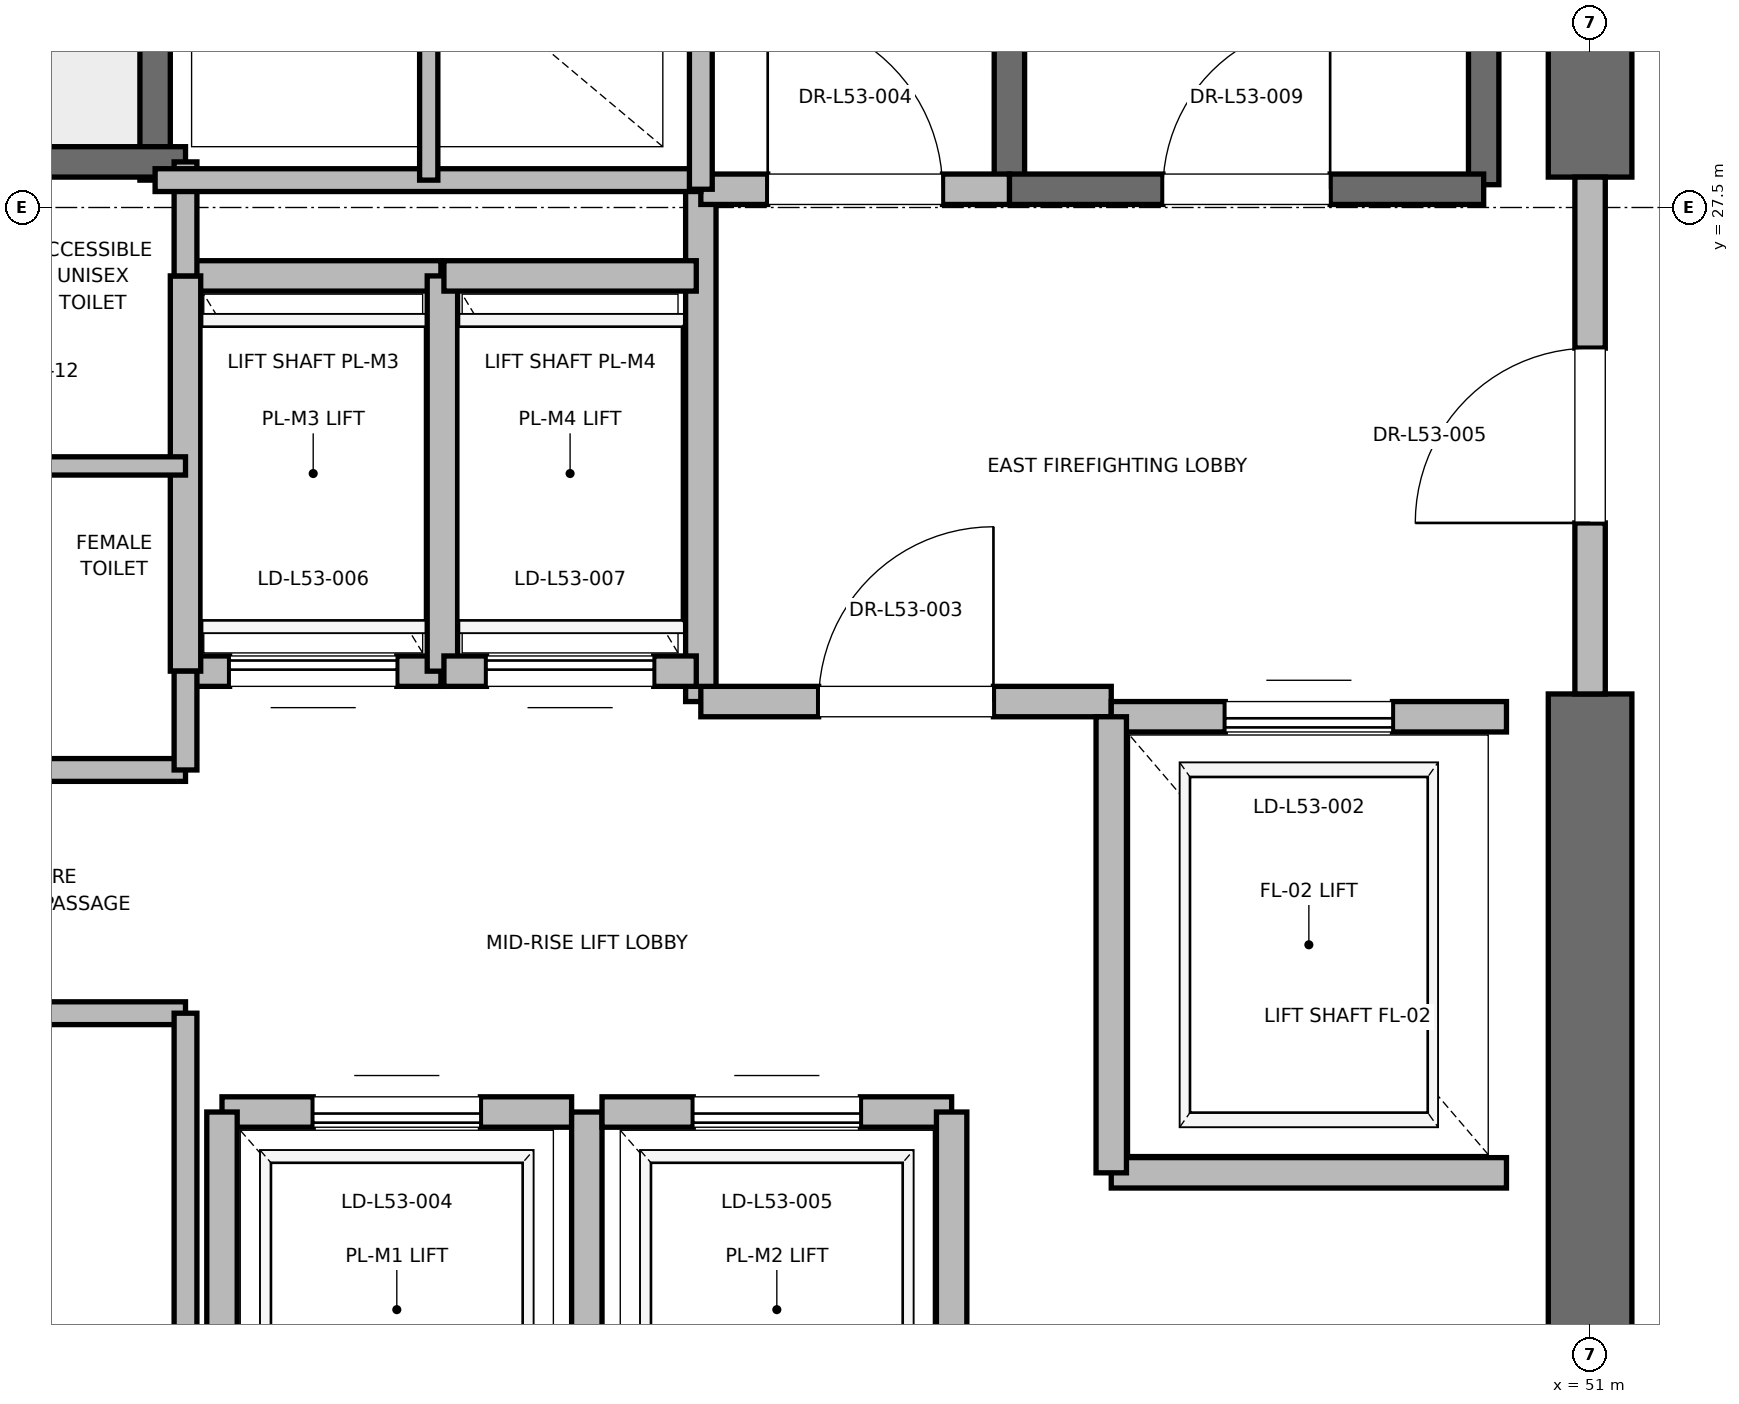
"""IFC4 building model, lengths in metres.
Left out: names, types, materials, properties, quantities, classifications, styles, units other than length and angle.
Written with IfcOpenShell. Run it as: python <this file> out.ifc"""

import sys

from ifc_helpers import new_model, si_unit, direction, frame, frame_2d, origin, place, context, subcontext, project, spatial, rectangle, extrude, element, fill, save


model = new_model("IFC4")
c1 = context("Model", 3, precision=1e-05, world=origin(), true_north=direction((0.0, 1.0)))
c2 = subcontext(c1, "Body", "Model", "MODEL_VIEW")
j1 = project(units=[si_unit("LENGTHUNIT", "METRE"), si_unit("PLANEANGLEUNIT", "RADIAN")], contexts=[c1])
p1 = place(None, origin())
s1 = spatial("IfcSite", under=j1, at=p1, CompositionType="ELEMENT")
p2 = place(p1, origin())
s2 = spatial("IfcBuilding", under=s1, at=p2, CompositionType="ELEMENT")
p3 = place(p2, frame((0.0, 0.0, 229.2)))
s3 = spatial("IfcBuildingStorey", under=s2, at=p3, CompositionType="ELEMENT", Elevation=229.2)
p4 = place(p3, frame((51.0, 18.5, 0.0), z_axis=(0.0, 0.0, 1.0), x_axis=(0.0, 1.0, 0.0)))
e1 = element("IfcWall", 1, at=p4, inside=s3, PredefinedType="SHEAR", context=c2, shape_type="SweptSolid", body=[
    extrude(rectangle(XDim=5.8, YDim=0.55, at=frame_2d((2.9, 0.0))), origin(), (0.0, 0.0, 1.0), 3.7),
])
p5 = place(p3, frame((51.0, 27.7, 0.0), z_axis=(0.0, 0.0, 1.0), x_axis=(0.0, 1.0, 0.0)))
e2 = element("IfcWall", 2, at=p5, inside=s3, PredefinedType="SHEAR", context=c2, shape_type="SweptSolid", body=[
    extrude(rectangle(XDim=8.8, YDim=0.55, at=frame_2d((4.4, 0.0))), origin(), (0.0, 0.0, 1.0), 3.7),
])
p6 = place(p3, frame((50.3, 27.65, 0.0), z_axis=(0.0, 0.0, 1.0), x_axis=(0.0, 1.0, 0.0)))
e3 = element("IfcWall", 3, at=p6, inside=s3, PredefinedType="SOLIDWALL", context=c2, shape_type="SweptSolid", body=[
    extrude(rectangle(XDim=8.15, YDim=0.2, at=frame_2d((4.075, 0.0))), origin(), (0.0, 0.0, 1.0), 3.7),
])
p7 = place(p3, frame((47.18, 27.62, 0.0), z_axis=(0.0, 0.0, 1.0), x_axis=(0.0, 1.0, 0.0)))
e4 = element("IfcWall", 4, at=p7, inside=s3, PredefinedType="SOLIDWALL", context=c2, shape_type="SweptSolid", body=[
    extrude(rectangle(XDim=8.18, YDim=0.2, at=frame_2d((4.09, 0.0))), origin(), (0.0, 0.0, 1.0), 3.7),
])
p8 = place(p3, frame((47.18, 27.62, 0.0), z_axis=(0.0, 0.0, 1.0), x_axis=(1.0, 0.0, 0.0)))
e5 = element("IfcWall", 5, at=p8, inside=s3, PredefinedType="SOLIDWALL", context=c2, shape_type="SweptSolid", body=[
    extrude(rectangle(XDim=3.12, YDim=0.2, at=frame_2d((1.56, 0.0))), origin(), (0.0, 0.0, 1.0), 3.7),
])
p9 = place(p8, frame((1.01, 0.0, 0.0)))
e6 = element("IfcOpeningElement", 6, at=p9, cuts=e5, PredefinedType="OPENING", context=c2, shape_type="SweptSolid", body=[
    extrude(rectangle(XDim=1.1, YDim=2.15, at=frame_2d((0.55, 1.075))), frame((0.0, 0.1, 0.0), z_axis=(0.0, -1.0, 0.0), x_axis=(1.0, 0.0, 0.0)), (0.0, 0.0, 1.0), 0.2),
])
p10 = place(p3, frame((41.56, 27.68, 0.0), z_axis=(0.0, 0.0, 1.0), x_axis=(0.0, 1.0, 0.0)))
e7 = element("IfcWall", 7, at=p10, inside=s3, PredefinedType="SOLIDWALL", context=c2, shape_type="SweptSolid", body=[
    extrude(rectangle(XDim=8.57, YDim=0.2, at=frame_2d((4.285, 0.0))), origin(), (0.0, 0.0, 1.0), 3.7),
])
p11 = place(p3, frame((38.44, 27.8, 0.0), z_axis=(0.0, 0.0, 1.0), x_axis=(1.0, 0.0, 0.0)))
e8 = element("IfcWall", 8, at=p11, inside=s3, PredefinedType="SOLIDWALL", context=c2, shape_type="SweptSolid", body=[
    extrude(rectangle(XDim=3.32, YDim=0.2, at=frame_2d((1.66, 0.0))), origin(), (0.0, 0.0, 1.0), 3.7),
])
p12 = place(p3, frame((45.15, 24.25, 0.0), z_axis=(0.0, 0.0, 1.0), x_axis=(0.0, 1.0, 0.0)))
e9 = element("IfcWall", 9, at=p12, inside=s3, PredefinedType="PARTITIONING", context=c2, shape_type="SweptSolid", body=[
    extrude(rectangle(XDim=3.37, YDim=0.2, at=frame_2d((1.685, 0.0))), origin(), (0.0, 0.0, 1.0), 3.7),
])
p13 = place(p3, frame((45.15, 24.25, 0.0), z_axis=(0.0, 0.0, 1.0), x_axis=(1.0, 0.0, 0.0)))
e10 = element("IfcWall", 10, at=p13, inside=s3, PredefinedType="PARTITIONING", context=c2, shape_type="SweptSolid", body=[
    extrude(rectangle(XDim=2.7, YDim=0.2, at=frame_2d((1.35, 0.0))), origin(), (0.0, 0.0, 1.0), 3.7),
])
p14 = place(p13, frame((0.775, 0.0, 0.0)))
e11 = element("IfcOpeningElement", 11, at=p14, cuts=e10, PredefinedType="OPENING", context=c2, shape_type="SweptSolid", body=[
    extrude(rectangle(XDim=1.15, YDim=2.2, at=frame_2d((0.575, 1.1))), frame((0.0, 0.1, 0.0), z_axis=(0.0, -1.0, 0.0), x_axis=(1.0, 0.0, 0.0)), (0.0, 0.0, 1.0), 0.2),
])
p15 = place(p3, frame((45.15, 27.62, 0.0), z_axis=(0.0, 0.0, 1.0), x_axis=(1.0, 0.0, 0.0)))
e12 = element("IfcWall", 12, at=p15, inside=s3, PredefinedType="PARTITIONING", context=c2, shape_type="SweptSolid", body=[
    extrude(rectangle(XDim=2.03, YDim=0.2, at=frame_2d((1.015, 0.0))), origin(), (0.0, 0.0, 1.0), 3.7),
])
p16 = place(p15, frame((0.44, 0.0, 0.0)))
e13 = element("IfcOpeningElement", 13, at=p16, cuts=e12, PredefinedType="OPENING", context=c2, shape_type="SweptSolid", body=[
    extrude(rectangle(XDim=1.15, YDim=2.2, at=frame_2d((0.575, 1.1))), frame((0.0, 0.1, 0.0), z_axis=(0.0, -1.0, 0.0), x_axis=(1.0, 0.0, 0.0)), (0.0, 0.0, 1.0), 0.2),
])
p17 = place(p3, frame((51.0, 24.3, 0.0), z_axis=(0.0, 0.0, 1.0), x_axis=(0.0, 1.0, 0.0)))
e14 = element("IfcWall", 14, at=p17, inside=s3, PredefinedType="PARTITIONING", context=c2, shape_type="SweptSolid", body=[
    extrude(rectangle(XDim=3.4, YDim=0.2, at=frame_2d((1.7, 0.0))), origin(), (0.0, 0.0, 1.0), 2.68),
])
p18 = place(p17, frame((1.125, 0.0, 0.0)))
e15 = element("IfcOpeningElement", 15, at=p18, cuts=e14, PredefinedType="OPENING", context=c2, shape_type="SweptSolid", body=[
    extrude(rectangle(XDim=1.15, YDim=2.2, at=frame_2d((0.575, 1.1))), frame((0.0, 0.1, 0.0), z_axis=(0.0, -1.0, 0.0), x_axis=(1.0, 0.0, 0.0)), (0.0, 0.0, 1.0), 0.2),
])
p19 = place(p3, frame((47.85, 21.15, 0.0), z_axis=(0.0, 0.0, 1.0), x_axis=(1.0, 0.0, 0.0)))
e16 = element("IfcWall", 16, at=p19, inside=s3, PredefinedType="SOLIDWALL", context=c2, shape_type="SweptSolid", body=[
    extrude(rectangle(XDim=2.6, YDim=0.2, at=frame_2d((1.3, 0.0))), origin(), (0.0, 0.0, 1.0), 3.7),
])
p20 = place(p3, frame((50.45, 24.15, 0.0), z_axis=(0.0, 0.0, 1.0), x_axis=(-1.0, 0.0, 0.0)))
e17 = element("IfcWall", 17, at=p20, inside=s3, PredefinedType="SOLIDWALL", context=c2, shape_type="SweptSolid", body=[
    extrude(rectangle(XDim=2.6, YDim=0.2, at=frame_2d((1.3, 0.0))), origin(), (0.0, 0.0, 1.0), 2.68),
])
p21 = place(p20, frame((0.75, 0.0, 0.0)))
e18 = element("IfcOpeningElement", 18, at=p21, cuts=e17, PredefinedType="OPENING", context=c2, shape_type="SweptSolid", body=[
    extrude(rectangle(XDim=1.1, YDim=2.2, at=frame_2d((0.55, 1.1))), frame((0.0, 0.1, 0.0), z_axis=(0.0, -1.0, 0.0), x_axis=(1.0, 0.0, 0.0)), (0.0, 0.0, 1.0), 0.2),
])
p22 = place(p3, frame((47.85, 24.15, 0.0), z_axis=(0.0, 0.0, 1.0), x_axis=(0.0, -1.0, 0.0)))
e19 = element("IfcWall", 19, at=p22, inside=s3, PredefinedType="SOLIDWALL", context=c2, shape_type="SweptSolid", body=[
    extrude(rectangle(XDim=3.0, YDim=0.2, at=frame_2d((1.5, 0.0))), origin(), (0.0, 0.0, 1.0), 3.7),
])
p23 = place(p3, frame((44.3, 21.55, 0.0), z_axis=(0.0, 0.0, 1.0), x_axis=(-1.0, 0.0, 0.0)))
e20 = element("IfcWall", 20, at=p23, inside=s3, PredefinedType="SOLIDWALL", context=c2, shape_type="SweptSolid", body=[
    extrude(rectangle(XDim=2.3, YDim=0.2, at=frame_2d((1.15, 0.0))), origin(), (0.0, 0.0, 1.0), 3.7),
])
p24 = place(p23, frame((0.6, 0.0, 0.0)))
e21 = element("IfcOpeningElement", 21, at=p24, cuts=e20, PredefinedType="OPENING", context=c2, shape_type="SweptSolid", body=[
    extrude(rectangle(XDim=1.1, YDim=2.2, at=frame_2d((0.55, 1.1))), frame((0.0, 0.1, 0.0), z_axis=(0.0, -1.0, 0.0), x_axis=(1.0, 0.0, 0.0)), (0.0, 0.0, 1.0), 0.2),
])
p25 = place(p3, frame((42.0, 21.55, 0.0), z_axis=(0.0, 0.0, 1.0), x_axis=(0.0, -1.0, 0.0)))
e22 = element("IfcWall", 22, at=p25, inside=s3, PredefinedType="SOLIDWALL", context=c2, shape_type="SweptSolid", body=[
    extrude(rectangle(XDim=2.6, YDim=0.2, at=frame_2d((1.3, 0.0))), origin(), (0.0, 0.0, 1.0), 2.68),
])
p26 = place(p3, frame((44.4, 18.95, 0.0), z_axis=(0.0, 0.0, 1.0), x_axis=(0.0, 1.0, 0.0)))
e23 = element("IfcWall", 23, at=p26, inside=s3, PredefinedType="SOLIDWALL", context=c2, shape_type="SweptSolid", body=[
    extrude(rectangle(XDim=2.6, YDim=0.2, at=frame_2d((1.3, 0.0))), origin(), (0.0, 0.0, 1.0), 3.7),
])
p27 = place(p3, frame((46.8, 21.55, 0.0), z_axis=(0.0, 0.0, 1.0), x_axis=(-1.0, 0.0, 0.0)))
e24 = element("IfcWall", 24, at=p27, inside=s3, PredefinedType="SOLIDWALL", context=c2, shape_type="SweptSolid", body=[
    extrude(rectangle(XDim=2.3, YDim=0.2, at=frame_2d((1.15, 0.0))), origin(), (0.0, 0.0, 1.0), 3.7),
])
p28 = place(p27, frame((0.6, 0.0, 0.0)))
e25 = element("IfcOpeningElement", 25, at=p28, cuts=e24, PredefinedType="OPENING", context=c2, shape_type="SweptSolid", body=[
    extrude(rectangle(XDim=1.1, YDim=2.2, at=frame_2d((0.55, 1.1))), frame((0.0, 0.1, 0.0), z_axis=(0.0, -1.0, 0.0), x_axis=(1.0, 0.0, 0.0)), (0.0, 0.0, 1.0), 0.2),
])
p29 = place(p3, frame((46.8, 18.95, 0.0), z_axis=(0.0, 0.0, 1.0), x_axis=(0.0, 1.0, 0.0)))
e26 = element("IfcWall", 26, at=p29, inside=s3, PredefinedType="SOLIDWALL", context=c2, shape_type="SweptSolid", body=[
    extrude(rectangle(XDim=2.6, YDim=0.2, at=frame_2d((1.3, 0.0))), origin(), (0.0, 0.0, 1.0), 3.7),
])
p30 = place(p3, frame((41.76, 24.45, 0.0), z_axis=(0.0, 0.0, 1.0), x_axis=(1.0, 0.0, 0.0)))
e27 = element("IfcWall", 27, at=p30, inside=s3, PredefinedType="SOLIDWALL", context=c2, shape_type="SweptSolid", body=[
    extrude(rectangle(XDim=1.68, YDim=0.2, at=frame_2d((0.84, 0.0))), origin(), (0.0, 0.0, 1.0), 3.7),
])
p31 = place(p30, frame((0.29, 0.0, 0.0)))
e28 = element("IfcOpeningElement", 28, at=p31, cuts=e27, PredefinedType="OPENING", context=c2, shape_type="SweptSolid", body=[
    extrude(rectangle(XDim=1.1, YDim=2.2, at=frame_2d((0.55, 1.1))), frame((0.0, 0.1, 0.0), z_axis=(0.0, -1.0, 0.0), x_axis=(1.0, 0.0, 0.0)), (0.0, 0.0, 1.0), 0.2),
])
p32 = place(p3, frame((43.44, 27.05, 0.0), z_axis=(0.0, 0.0, 1.0), x_axis=(-1.0, 0.0, 0.0)))
e29 = element("IfcWall", 29, at=p32, inside=s3, PredefinedType="SOLIDWALL", context=c2, shape_type="SweptSolid", body=[
    extrude(rectangle(XDim=1.68, YDim=0.2, at=frame_2d((0.84, 0.0))), origin(), (0.0, 0.0, 1.0), 3.7),
])
for number, where, z_axis, x_axis in (
    (30, (41.76, 27.05, 0.0), (0.0, 0.0, 1.0), (0.0, -1.0, 0.0)),
    (31, (43.45, 24.45, 0.0), (0.0, 0.0, 1.0), (0.0, 1.0, 0.0)),
):
    element("IfcWall", number, at=place(p3, frame(where, z_axis=z_axis, x_axis=x_axis)), inside=s3, PredefinedType="SOLIDWALL", context=c2, shape_type="SweptSolid", body=[
        extrude(rectangle(XDim=2.6, YDim=0.2, at=frame_2d((1.3, 0.0))), origin(), (0.0, 0.0, 1.0), 3.7),
    ])
p33 = place(p3, frame((43.46, 24.45, 0.0), z_axis=(0.0, 0.0, 1.0), x_axis=(1.0, 0.0, 0.0)))
e32 = element("IfcWall", 32, at=p33, inside=s3, PredefinedType="SOLIDWALL", context=c2, shape_type="SweptSolid", body=[
    extrude(rectangle(XDim=1.66, YDim=0.2, at=frame_2d((0.83, 0.0))), origin(), (0.0, 0.0, 1.0), 3.7),
])
p34 = place(p33, frame((0.28, 0.0, 0.0)))
e33 = element("IfcOpeningElement", 33, at=p34, cuts=e32, PredefinedType="OPENING", context=c2, shape_type="SweptSolid", body=[
    extrude(rectangle(XDim=1.1, YDim=2.2, at=frame_2d((0.55, 1.1))), frame((0.0, 0.1, 0.0), z_axis=(0.0, -1.0, 0.0), x_axis=(1.0, 0.0, 0.0)), (0.0, 0.0, 1.0), 0.2),
])
p35 = place(p3, frame((45.12, 27.05, 0.0), z_axis=(0.0, 0.0, 1.0), x_axis=(-1.0, 0.0, 0.0)))
e34 = element("IfcWall", 34, at=p35, inside=s3, PredefinedType="SOLIDWALL", context=c2, shape_type="SweptSolid", body=[
    extrude(rectangle(XDim=1.66, YDim=0.2, at=frame_2d((0.83, 0.0))), origin(), (0.0, 0.0, 1.0), 3.7),
])
for number, where, z_axis, x_axis in (
    (35, (39.95, 22.2, 0.0), (0.0, 0.0, 1.0), (1.0, 0.0, 0.0)),
    (36, (39.95, 23.8, 0.0), (0.0, 0.0, 1.0), (1.0, 0.0, 0.0)),
):
    element("IfcWall", number, at=place(p3, frame(where, z_axis=z_axis, x_axis=x_axis)), inside=s3, PredefinedType="PARTITIONING", context=c2, shape_type="SweptSolid", body=[
        extrude(rectangle(XDim=1.81, YDim=0.15, at=frame_2d((0.905, 0.0))), origin(), (0.0, 0.0, 1.0), 2.85),
    ])
p36 = place(p3, frame((39.95, 25.8, 0.0), z_axis=(0.0, 0.0, 1.0), x_axis=(1.0, 0.0, 0.0)))
e37 = element("IfcWall", 37, at=p36, inside=s3, PredefinedType="PARTITIONING", context=c2, shape_type="SweptSolid", body=[
    extrude(rectangle(XDim=1.81, YDim=0.12, at=frame_2d((0.905, 0.0))), origin(), (0.0, 0.0, 1.0), 2.85),
])
p37 = place(p3, frame((41.76, 18.6, 0.0), z_axis=(0.0, 0.0, 1.0), x_axis=(0.0, 1.0, 0.0)))
e38 = element("IfcWall", 38, at=p37, inside=s3, PredefinedType="PARTITIONING", context=c2, shape_type="SweptSolid", body=[
    extrude(rectangle(XDim=3.6, YDim=0.15, at=frame_2d((1.8, 0.0))), origin(), (0.0, 0.0, 1.0), 2.68),
])
p38 = place(p3, frame((41.76, 23.8, 0.0), z_axis=(0.0, 0.0, 1.0), x_axis=(0.0, 1.0, 0.0)))
e39 = element("IfcWall", 39, at=p38, inside=s3, PredefinedType="PARTITIONING", context=c2, shape_type="SweptSolid", body=[
    extrude(rectangle(XDim=0.65, YDim=0.15, at=frame_2d((0.325, 0.0))), origin(), (0.0, 0.0, 1.0), 2.85),
])
p39 = place(p3, frame((41.76, 27.05, 0.0), z_axis=(0.0, 0.0, 1.0), x_axis=(0.0, 1.0, 0.0)))
e40 = element("IfcWall", 40, at=p39, inside=s3, PredefinedType="PARTITIONING", context=c2, shape_type="SweptSolid", body=[
    extrude(rectangle(XDim=0.75, YDim=0.15, at=frame_2d((0.375, 0.0))), origin(), (0.0, 0.0, 1.0), 2.85),
])
p40 = place(p3, frame((41.56, 27.68, 0.0), z_axis=(0.0, 0.0, 1.0), x_axis=(1.0, 0.0, 0.0)))
e41 = element("IfcWall", 41, at=p40, inside=s3, PredefinedType="PARTITIONING", context=c2, shape_type="SweptSolid", body=[
    extrude(rectangle(XDim=3.59, YDim=0.15, at=frame_2d((1.795, 0.0))), origin(), (0.0, 0.0, 1.0), 2.85),
])
p41 = place(p3, frame((45.15, 27.62, 0.0), z_axis=(0.0, 0.0, 1.0), x_axis=(0.0, 1.0, 0.0)))
e42 = element("IfcWall", 42, at=p41, inside=s3, PredefinedType="PARTITIONING", context=c2, shape_type="SweptSolid", body=[
    extrude(rectangle(XDim=3.1, YDim=0.15, at=frame_2d((1.55, 0.0))), origin(), (0.0, 0.0, 1.0), 2.85),
])
p42 = place(p3, frame((43.36, 27.68, 0.0), z_axis=(0.0, 0.0, 1.0), x_axis=(0.0, 1.0, 0.0)))
e43 = element("IfcWall", 43, at=p42, inside=s3, PredefinedType="PARTITIONING", context=c2, shape_type="SweptSolid", body=[
    extrude(rectangle(XDim=3.04, YDim=0.12, at=frame_2d((1.52, 0.0))), origin(), (0.0, 0.0, 1.0), 2.85),
])
p43 = place(p9, origin())
e44 = element("IfcDoor", 44, at=p43, inside=s3, OperationType="SINGLE_SWING_RIGHT", PredefinedType="DOOR", context=c2, shape_type="SweptSolid", body=[
    extrude(rectangle(XDim=1.1, YDim=2.15, at=frame_2d((0.55, 1.075))), frame((0.0, 0.025, 0.0), z_axis=(0.0, -1.0, 0.0), x_axis=(1.0, 0.0, 0.0)), (0.0, 0.0, 1.0), 0.05),
])
fill(e6, e44)
p44 = place(p14, origin())
e45 = element("IfcDoor", 45, at=p44, inside=s3, OperationType="SINGLE_SWING_RIGHT", PredefinedType="DOOR", context=c2, shape_type="SweptSolid", body=[
    extrude(rectangle(XDim=1.15, YDim=2.2, at=frame_2d((0.575, 1.1))), frame((0.0, 0.025, 0.0), z_axis=(0.0, -1.0, 0.0), x_axis=(1.0, 0.0, 0.0)), (0.0, 0.0, 1.0), 0.05),
])
fill(e11, e45)
p45 = place(p16, origin())
e46 = element("IfcDoor", 46, at=p45, inside=s3, OperationType="SINGLE_SWING_LEFT", PredefinedType="DOOR", context=c2, shape_type="SweptSolid", body=[
    extrude(rectangle(XDim=1.15, YDim=2.2, at=frame_2d((0.575, 1.1))), frame((0.0, 0.025, 0.0), z_axis=(0.0, -1.0, 0.0), x_axis=(1.0, 0.0, 0.0)), (0.0, 0.0, 1.0), 0.05),
])
fill(e13, e46)
p46 = place(p18, origin())
e47 = element("IfcDoor", 47, at=p46, inside=s3, OperationType="SINGLE_SWING_LEFT", PredefinedType="DOOR", context=c2, shape_type="SweptSolid", body=[
    extrude(rectangle(XDim=1.15, YDim=2.2, at=frame_2d((0.575, 1.1))), frame((0.0, 0.025, 0.0), z_axis=(0.0, -1.0, 0.0), x_axis=(1.0, 0.0, 0.0)), (0.0, 0.0, 1.0), 0.05),
])
fill(e15, e47)
p47 = place(p21, origin())
e48 = element("IfcDoor", 48, at=p47, inside=s3, OperationType="SLIDING_TO_RIGHT", PredefinedType="DOOR", context=c2, shape_type="SweptSolid", body=[
    extrude(rectangle(XDim=1.1, YDim=2.2, at=frame_2d((0.55, 1.1))), frame((0.0, 0.025, 0.0), z_axis=(0.0, -1.0, 0.0), x_axis=(1.0, 0.0, 0.0)), (0.0, 0.0, 1.0), 0.05),
])
fill(e18, e48)
p48 = place(p24, origin())
e49 = element("IfcDoor", 49, at=p48, inside=s3, OperationType="SLIDING_TO_RIGHT", PredefinedType="DOOR", context=c2, shape_type="SweptSolid", body=[
    extrude(rectangle(XDim=1.1, YDim=2.2, at=frame_2d((0.55, 1.1))), frame((0.0, 0.025, 0.0), z_axis=(0.0, -1.0, 0.0), x_axis=(1.0, 0.0, 0.0)), (0.0, 0.0, 1.0), 0.05),
])
fill(e21, e49)
p49 = place(p28, origin())
e50 = element("IfcDoor", 50, at=p49, inside=s3, OperationType="SLIDING_TO_RIGHT", PredefinedType="DOOR", context=c2, shape_type="SweptSolid", body=[
    extrude(rectangle(XDim=1.1, YDim=2.2, at=frame_2d((0.55, 1.1))), frame((0.0, 0.025, 0.0), z_axis=(0.0, -1.0, 0.0), x_axis=(1.0, 0.0, 0.0)), (0.0, 0.0, 1.0), 0.05),
])
fill(e25, e50)
p50 = place(p31, origin())
e51 = element("IfcDoor", 51, at=p50, inside=s3, OperationType="SLIDING_TO_RIGHT", PredefinedType="DOOR", context=c2, shape_type="SweptSolid", body=[
    extrude(rectangle(XDim=1.1, YDim=2.2, at=frame_2d((0.55, 1.1))), frame((0.0, 0.025, 0.0), z_axis=(0.0, -1.0, 0.0), x_axis=(1.0, 0.0, 0.0)), (0.0, 0.0, 1.0), 0.05),
])
fill(e28, e51)
p51 = place(p34, origin())
e52 = element("IfcDoor", 52, at=p51, inside=s3, OperationType="SLIDING_TO_RIGHT", PredefinedType="DOOR", context=c2, shape_type="SweptSolid", body=[
    extrude(rectangle(XDim=1.1, YDim=2.2, at=frame_2d((0.55, 1.1))), frame((0.0, 0.025, 0.0), z_axis=(0.0, -1.0, 0.0), x_axis=(1.0, 0.0, 0.0)), (0.0, 0.0, 1.0), 0.05),
])
fill(e33, e52)
save(model, sys.argv[1])
